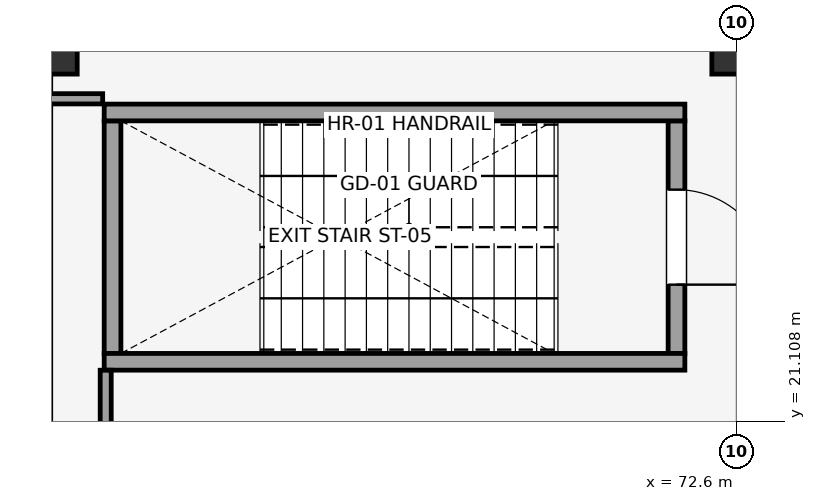
"""IFC4 building model, lengths in metres.
Left out: names, types, materials, properties, quantities, classifications, styles, units other than length and angle.
Written with IfcOpenShell. Run it as: python <this file> out.ifc"""

import sys

from ifc_helpers import new_model, si_unit, direction, frame, frame_2d, origin, origin_2d, place, context, subcontext, project, spatial, rectangle, extrude, element, fill, save


model = new_model("IFC4")
c1 = context("Model", 3, precision=1e-05, world=origin(), true_north=direction((0.0, 1.0)))
c2 = subcontext(c1, "Body", "Model", "MODEL_VIEW")
j1 = project(units=[si_unit("LENGTHUNIT", "METRE"), si_unit("PLANEANGLEUNIT", "RADIAN")], contexts=[c1])
p1 = place(None, origin())
s1 = spatial("IfcSite", under=j1, at=p1, CompositionType="ELEMENT")
p2 = place(p1, origin())
s2 = spatial("IfcBuilding", under=s1, at=p2, CompositionType="ELEMENT")
p3 = place(p2, frame((0.0, 0.0, 4.5)))
s3 = spatial("IfcBuildingStorey", under=s2, at=p3, CompositionType="ELEMENT", Elevation=4.5)
for number, where, z_axis, x_axis in (
    (1, (63.6, 26.0, 0.0), (0.0, 0.0, 1.0), (1.0, 0.0, 0.0)),
    (2, (72.6, 26.0, 0.0), (0.0, 0.0, 1.0), (1.0, 0.0, 0.0)),
):
    element("IfcColumn", number, at=place(p3, frame(where, z_axis=z_axis, x_axis=x_axis)), inside=s3, PredefinedType="COLUMN", context=c2, shape_type="SweptSolid", body=[
        extrude(rectangle(XDim=0.65, YDim=0.65, at=origin_2d()), origin(), (0.0, 0.0, 1.0), 4.5),
    ])
p4 = place(p3, frame((71.81, 25.06, 0.0), z_axis=(0.0, 0.0, 1.0), x_axis=(0.0, -1.0, 0.0)))
e3 = element("IfcWall", 3, at=p4, inside=s3, PredefinedType="SHEAR", context=c2, shape_type="SweptSolid", body=[
    extrude(rectangle(XDim=3.06, YDim=0.22, at=frame_2d((1.53, 0.0))), origin(), (0.0, 0.0, 1.0), 4.5),
])
p5 = place(p4, frame((0.905, 0.0, 0.0)))
e4 = element("IfcOpeningElement", 4, at=p5, cuts=e3, PredefinedType="OPENING", context=c2, shape_type="SweptSolid", body=[
    extrude(rectangle(XDim=1.25, YDim=2.15, at=frame_2d((0.625, 1.075))), frame((0.0, 0.12, 0.0), z_axis=(0.0, -1.0, 0.0), x_axis=(1.0, 0.0, 0.0)), (0.0, 0.0, 1.0), 0.24),
])
p6 = place(p3, frame((64.39, 25.06, 0.0), z_axis=(0.0, 0.0, 1.0), x_axis=(0.0, -1.0, 0.0)))
e5 = element("IfcWall", 5, at=p6, inside=s3, PredefinedType="SHEAR", context=c2, shape_type="SweptSolid", body=[
    extrude(rectangle(XDim=3.06, YDim=0.22, at=frame_2d((1.53, 0.0))), origin(), (0.0, 0.0, 1.0), 4.5),
])
for number, where, z_axis, x_axis in (
    (6, (71.92, 25.17, 0.0), (0.0, 0.0, 1.0), (-1.0, 0.0, 0.0)),
    (7, (71.92, 21.89, 0.0), (0.0, 0.0, 1.0), (-1.0, 0.0, 0.0)),
):
    element("IfcWall", number, at=place(p3, frame(where, z_axis=z_axis, x_axis=x_axis)), inside=s3, PredefinedType="SHEAR", context=c2, shape_type="SweptSolid", body=[
        extrude(rectangle(XDim=7.64, YDim=0.22, at=frame_2d((3.82, 0.0))), origin(), (0.0, 0.0, 1.0), 4.5),
    ])
p7 = place(p3, frame((61.401, 25.35, 0.0), z_axis=(0.0, 0.0, 1.0), x_axis=(1.0, 0.0, 0.0)))
e8 = element("IfcWall", 8, at=p7, inside=s3, PredefinedType="PARTITIONING", context=c2, shape_type="SweptSolid", body=[
    extrude(rectangle(XDim=2.859, YDim=0.135, at=frame_2d((1.43, 0.0))), origin(), (0.0, 0.0, 1.0), 2.7),
])
p8 = place(p3, frame((64.3, 21.779, 0.0), z_axis=(0.0, 0.0, 1.0), x_axis=(0.0, -1.0, 0.0)))
e9 = element("IfcWall", 9, at=p8, inside=s3, PredefinedType="PARTITIONING", context=c2, shape_type="SweptSolid", body=[
    extrude(rectangle(XDim=3.779, YDim=0.145, at=frame_2d((1.89, 0.0))), origin(), (0.0, 0.0, 1.0), 2.7),
])
p9 = place(p5, origin())
e10 = element("IfcDoor", 10, at=p9, inside=s3, OperationType="SINGLE_SWING_RIGHT", PredefinedType="DOOR", context=c2, shape_type="SweptSolid", body=[
    extrude(rectangle(XDim=1.25, YDim=2.15, at=frame_2d((0.625, 1.075))), frame((0.0, 0.025, 0.0), z_axis=(0.0, -1.0, 0.0), x_axis=(1.0, 0.0, 0.0)), (0.0, 0.0, 1.0), 0.05),
])
fill(e4, e10)
save(model, sys.argv[1])
